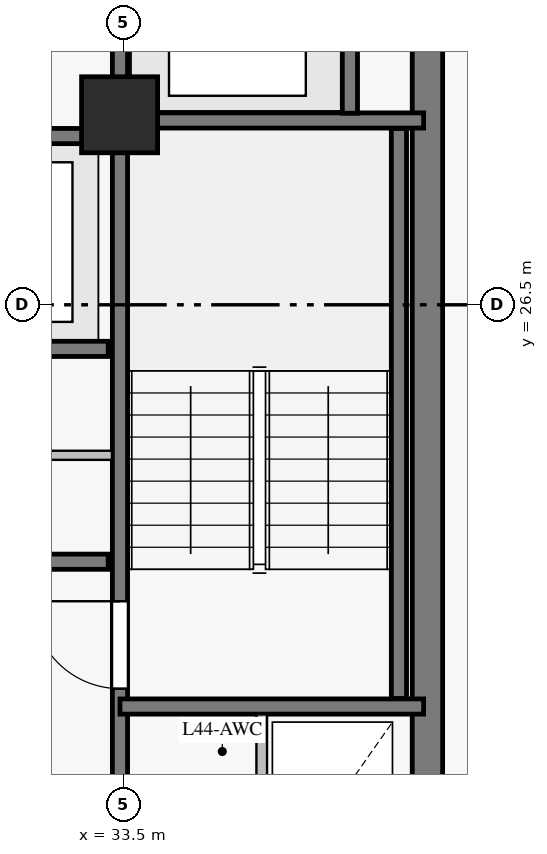
"""IFC4 building model, lengths in metres.
Left out: names, types, materials, properties, quantities, classifications, styles, units other than length and angle.
Written with IfcOpenShell. Run it as: python <this file> out.ifc"""

import sys

from ifc_helpers import new_model, si_unit, direction, frame, frame_2d, origin, origin_with_axes, origin_2d, place, context, subcontext, project, spatial, rectangle, extrude, source, transform, mapped, element, fill, save


model = new_model("IFC4")
c1 = context("Model", 3, precision=1e-05, world=origin(), true_north=direction((0.0, 1.0)))
c2 = subcontext(c1, "Body", "Model", "MODEL_VIEW")
j1 = project(units=[si_unit("LENGTHUNIT", "METRE"), si_unit("PLANEANGLEUNIT", "RADIAN")], contexts=[c1])
p1 = place(None, origin())
s1 = spatial("IfcSite", under=j1, at=p1, CompositionType="ELEMENT")
p2 = place(p1, origin())
s2 = spatial("IfcBuilding", under=s1, at=p2, CompositionType="ELEMENT")
p3 = place(p2, frame((0.0, 0.0, 156.55)))
s3 = spatial("IfcBuildingStorey", under=s2, at=p3, CompositionType="ELEMENT", Elevation=156.55)
p4 = place(p3, frame((37.5, 18.3, 0.0), z_axis=(0.0, 0.0, 1.0), x_axis=(0.0, 1.0, 0.0)))
e1 = element("IfcWall", 1, at=p4, inside=s3, PredefinedType="SHEAR", context=c2, shape_type="SweptSolid", body=[
    extrude(rectangle(XDim=16.4, YDim=0.4, at=frame_2d((8.2, 0.0))), origin(), (0.0, 0.0, 1.0), 2.825),
])
p5 = place(p4, frame((14.15, 0.0, 0.0)))
e2 = element("IfcOpeningElement", 2, at=p5, cuts=e1, PredefinedType="OPENING", context=c2, shape_type="SweptSolid", body=[
    extrude(rectangle(XDim=1.2, YDim=2.15, at=frame_2d((0.6, 1.075))), frame((0.0, 0.21, 0.0), z_axis=(0.0, -1.0, 0.0), x_axis=(1.0, 0.0, 0.0)), (0.0, 0.0, 1.0), 0.42),
])
m1 = source(origin_with_axes(), c2, "Body", "SweptSolid", [
    extrude(rectangle(XDim=1.0, YDim=1.0, at=origin_2d()), origin(), (0.0, 0.0, 1.0), 3.05),
])
p6 = place(p3, frame((33.45, 29.0, 0.0), z_axis=(0.0, 0.0, 1.0), x_axis=(1.0, 0.0, 0.0)))
e3 = element("IfcColumn", 3, at=p6, inside=s3, PredefinedType="COLUMN", context=c2, shape_type="MappedRepresentation", body=[
    mapped(m1, transform((0.0, 0.0, 0.0), scale=1.0)),
])
p7 = place(p3, frame((33.455, 18.7, 0.0), z_axis=(0.0, 0.0, 1.0), x_axis=(0.0, 1.0, 0.0)))
e4 = element("IfcWall", 4, at=p7, inside=s3, PredefinedType="SHEAR", context=c2, shape_type="SweptSolid", body=[
    extrude(rectangle(XDim=15.6, YDim=0.2, at=frame_2d((7.8, 0.0))), origin(), (0.0, 0.0, 1.0), 2.825),
])
p8 = place(p7, frame((2.75, 0.0, 0.0)))
e5 = element("IfcOpeningElement", 5, at=p8, cuts=e4, PredefinedType="OPENING", context=c2, shape_type="SweptSolid", body=[
    extrude(rectangle(XDim=1.15, YDim=2.15, at=frame_2d((0.575, 1.075))), frame((0.0, 0.11, 0.0), z_axis=(0.0, -1.0, 0.0), x_axis=(1.0, 0.0, 0.0)), (0.0, 0.0, 1.0), 0.22),
])
p9 = place(p7, frame((0.55, 0.0, 0.0)))
e6 = element("IfcOpeningElement", 6, at=p9, cuts=e4, PredefinedType="OPENING", context=c2, shape_type="SweptSolid", body=[
    extrude(rectangle(XDim=0.94, YDim=2.1, at=frame_2d((0.47, 1.05))), frame((0.0, 0.11, 0.0), z_axis=(0.0, -1.0, 0.0), x_axis=(1.0, 0.0, 0.0)), (0.0, 0.0, 1.0), 0.22),
])
p10 = place(p3, frame((23.7, 23.12, 0.0), z_axis=(0.0, 0.0, 1.0), x_axis=(1.0, 0.0, 0.0)))
e7 = element("IfcWall", 7, at=p10, inside=s3, PredefinedType="SHEAR", context=c2, shape_type="SweptSolid", body=[
    extrude(rectangle(XDim=9.6, YDim=0.2, at=frame_2d((4.8, 0.0))), origin(), (0.0, 0.0, 1.0), 2.825),
])
p11 = place(p10, frame((2.4, 0.0, 0.0)))
e8 = element("IfcOpeningElement", 8, at=p11, cuts=e7, PredefinedType="OPENING", context=c2, shape_type="SweptSolid", body=[
    extrude(rectangle(XDim=1.0, YDim=2.15, at=frame_2d((0.5, 1.075))), frame((0.0, 0.11, 0.0), z_axis=(0.0, -1.0, 0.0), x_axis=(1.0, 0.0, 0.0)), (0.0, 0.0, 1.0), 0.22),
])
p12 = place(p3, frame((23.7, 25.92, 0.0), z_axis=(0.0, 0.0, 1.0), x_axis=(1.0, 0.0, 0.0)))
e9 = element("IfcWall", 9, at=p12, inside=s3, PredefinedType="SHEAR", context=c2, shape_type="SweptSolid", body=[
    extrude(rectangle(XDim=9.6, YDim=0.2, at=frame_2d((4.8, 0.0))), origin(), (0.0, 0.0, 1.0), 2.825),
])
p13 = place(p3, frame((23.7, 28.72, 0.0), z_axis=(0.0, 0.0, 1.0), x_axis=(1.0, 0.0, 0.0)))
e10 = element("IfcWall", 10, at=p13, inside=s3, PredefinedType="SHEAR", context=c2, shape_type="SweptSolid", body=[
    extrude(rectangle(XDim=9.6, YDim=0.2, at=frame_2d((4.8, 0.0))), origin(), (0.0, 0.0, 1.0), 2.825),
])
p14 = place(p13, frame((0.6, 0.0, 0.0)))
e11 = element("IfcOpeningElement", 11, at=p14, cuts=e10, PredefinedType="OPENING", context=c2, shape_type="SweptSolid", body=[
    extrude(rectangle(XDim=1.1, YDim=2.15, at=frame_2d((0.55, 1.075))), frame((0.0, 0.11, 0.0), z_axis=(0.0, -1.0, 0.0), x_axis=(1.0, 0.0, 0.0)), (0.0, 0.0, 1.0), 0.22),
])
p15 = place(p13, frame((2.98, 0.0, 0.0)))
e12 = element("IfcOpeningElement", 12, at=p15, cuts=e10, PredefinedType="OPENING", context=c2, shape_type="SweptSolid", body=[
    extrude(rectangle(XDim=1.1, YDim=2.15, at=frame_2d((0.55, 1.075))), frame((0.0, 0.11, 0.0), z_axis=(0.0, -1.0, 0.0), x_axis=(1.0, 0.0, 0.0)), (0.0, 0.0, 1.0), 0.22),
])
p16 = place(p13, frame((5.36, 0.0, 0.0)))
e13 = element("IfcOpeningElement", 13, at=p16, cuts=e10, PredefinedType="OPENING", context=c2, shape_type="SweptSolid", body=[
    extrude(rectangle(XDim=1.1, YDim=2.15, at=frame_2d((0.55, 1.075))), frame((0.0, 0.11, 0.0), z_axis=(0.0, -1.0, 0.0), x_axis=(1.0, 0.0, 0.0)), (0.0, 0.0, 1.0), 0.22),
])
p17 = place(p13, frame((7.74, 0.0, 0.0)))
e14 = element("IfcOpeningElement", 14, at=p17, cuts=e10, PredefinedType="OPENING", context=c2, shape_type="SweptSolid", body=[
    extrude(rectangle(XDim=1.1, YDim=2.15, at=frame_2d((0.55, 1.075))), frame((0.0, 0.11, 0.0), z_axis=(0.0, -1.0, 0.0), x_axis=(1.0, 0.0, 0.0)), (0.0, 0.0, 1.0), 0.22),
])
p18 = place(p3, frame((37.125, 21.32, 0.0), z_axis=(0.0, 0.0, 1.0), x_axis=(0.0, 1.0, 0.0)))
e15 = element("IfcWall", 15, at=p18, inside=s3, PredefinedType="SHEAR", context=c2, shape_type="SweptSolid", body=[
    extrude(rectangle(XDim=7.5, YDim=0.2, at=frame_2d((3.75, 0.0))), origin(), (0.0, 0.0, 1.0), 2.825),
])
for number, where, z_axis, x_axis in (
    (16, (33.455, 21.215, 0.0), (0.0, 0.0, 1.0), (1.0, 0.0, 0.0)),
    (17, (33.455, 28.925, 0.0), (0.0, 0.0, 1.0), (1.0, 0.0, 0.0)),
):
    element("IfcWall", number, at=place(p3, frame(where, z_axis=z_axis, x_axis=x_axis)), inside=s3, PredefinedType="SHEAR", context=c2, shape_type="SweptSolid", body=[
        extrude(rectangle(XDim=3.995, YDim=0.2, at=frame_2d((1.998, 0.0))), origin(), (0.0, 0.0, 1.0), 2.825),
    ])
p19 = place(p3, frame((36.48, 29.02, 0.0), z_axis=(0.0, 0.0, 1.0), x_axis=(0.0, 1.0, 0.0)))
e18 = element("IfcWall", 18, at=p19, inside=s3, PredefinedType="SHEAR", context=c2, shape_type="SweptSolid", body=[
    extrude(rectangle(XDim=2.86, YDim=0.2, at=frame_2d((1.43, 0.0))), origin(), (0.0, 0.0, 1.0), 2.825),
])
p20 = place(p3, frame((23.652, 24.52, 0.0), z_axis=(0.0, 0.0, 1.0), x_axis=(1.0, 0.0, 0.0)))
e19 = element("IfcWall", 19, at=p20, inside=s3, PredefinedType="PARTITIONING", context=c2, shape_type="SweptSolid", body=[
    extrude(rectangle(XDim=9.698, YDim=0.12, at=frame_2d((4.849, 0.0))), origin(), (0.0, 0.0, 1.0), 2.825),
])
p21 = place(p20, frame((4.2, 0.0, 0.0)))
e20 = element("IfcOpeningElement", 20, at=p21, cuts=e19, PredefinedType="OPENING", context=c2, shape_type="SweptSolid", body=[
    extrude(rectangle(XDim=0.94, YDim=2.1, at=frame_2d((0.47, 1.05))), frame((0.0, 0.07, 0.0), z_axis=(0.0, -1.0, 0.0), x_axis=(1.0, 0.0, 0.0)), (0.0, 0.0, 1.0), 0.14),
])
p22 = place(p3, frame((35.32, 18.507, 0.0), z_axis=(0.0, 0.0, 1.0), x_axis=(0.0, 1.0, 0.0)))
e21 = element("IfcWall", 21, at=p22, inside=s3, PredefinedType="PARTITIONING", context=c2, shape_type="SweptSolid", body=[
    extrude(rectangle(XDim=2.604, YDim=0.14, at=frame_2d((1.302, 0.0))), origin(), (0.0, 0.0, 1.0), 2.825),
])
m2 = source(origin_with_axes(), c2, "Body", "SweptSolid", [
    extrude(rectangle(XDim=1.15, YDim=2.15, at=frame_2d((0.575, 1.075))), frame((0.0, 0.025, 0.0), z_axis=(0.0, -1.0, 0.0), x_axis=(1.0, 0.0, 0.0)), (0.0, 0.0, 1.0), 0.05),
])
p23 = place(p8, origin())
e22 = element("IfcDoor", 22, at=p23, inside=s3, OperationType="SINGLE_SWING_RIGHT", PredefinedType="DOOR", context=c2, shape_type="MappedRepresentation", body=[
    mapped(m2, transform((0.0, 0.0, 0.0), scale=1.0)),
])
fill(e5, e22)
save(model, sys.argv[1])
